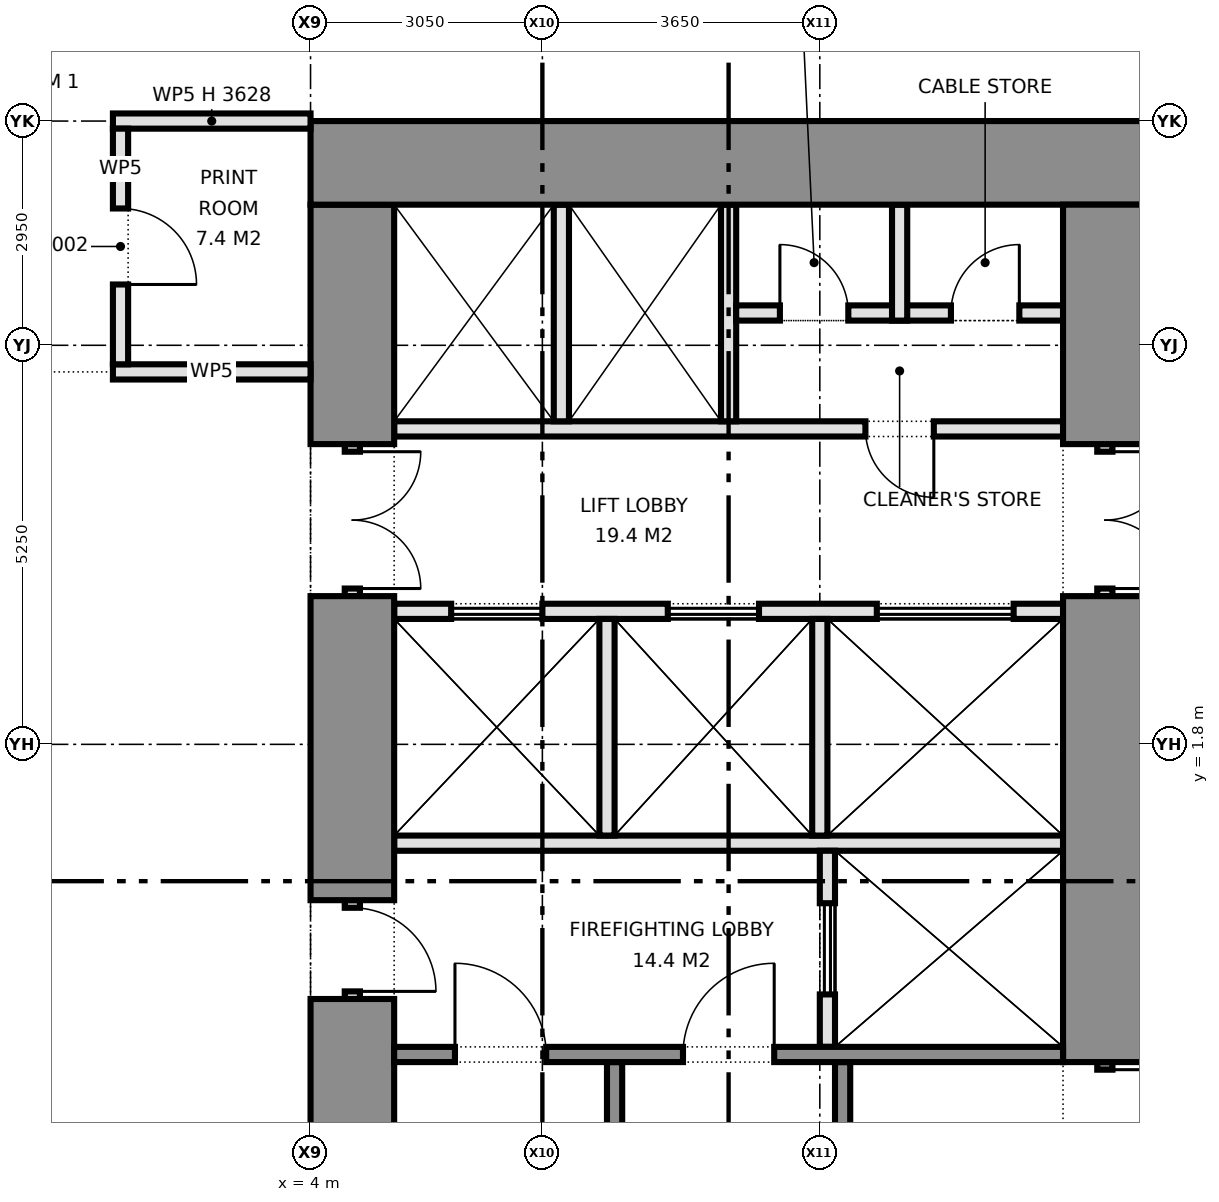
"""IFC4 building model, lengths in metres.
Left out: names, types, materials, properties, quantities, classifications, styles, units other than length and angle.
Written with IfcOpenShell. Run it as: python <this file> out.ifc"""

import sys

from ifc_helpers import new_model, si_unit, direction, frame, frame_2d, origin, place, context, subcontext, project, spatial, rectangle, extrude, element, fill, save


model = new_model("IFC4")
c1 = context("Model", 3, precision=1e-05, world=origin(), true_north=direction((0.0, 1.0)))
c2 = subcontext(c1, "Body", "Model", "MODEL_VIEW")
j1 = project(units=[si_unit("LENGTHUNIT", "METRE"), si_unit("PLANEANGLEUNIT", "RADIAN")], contexts=[c1])
p1 = place(None, origin())
s1 = spatial("IfcSite", under=j1, at=p1, CompositionType="ELEMENT")
p2 = place(p1, origin())
s2 = spatial("IfcBuilding", under=s1, at=p2, CompositionType="ELEMENT")
p3 = place(p2, frame((0.0, 0.0, 49.7)))
s3 = spatial("IfcBuildingStorey", under=s2, at=p3, CompositionType="ELEMENT", Elevation=49.7)
p4 = place(p3, frame((15.0, 9.45, 0.0), z_axis=(0.0, 0.0, 1.0), x_axis=(-1.0, 0.0, 0.0)))
e1 = element("IfcWall", 1, at=p4, inside=s3, PredefinedType="SHEAR", context=c2, shape_type="SweptSolid", body=[
    extrude(rectangle(XDim=11.0, YDim=1.1, at=frame_2d((5.5, 0.0))), origin(), (0.0, 0.0, 1.0), 4.575),
])
p5 = place(p3, frame((14.45, 8.9, 0.0), z_axis=(0.0, 0.0, 1.0), x_axis=(0.0, -1.0, 0.0)))
e2 = element("IfcWall", 2, at=p5, inside=s3, PredefinedType="SHEAR", context=c2, shape_type="SweptSolid", body=[
    extrude(rectangle(XDim=3.15, YDim=1.1, at=frame_2d((1.575, 0.0))), origin(), (0.0, 0.0, 1.0), 4.575),
])
p6 = place(p3, frame((14.45, 5.75, 0.0), z_axis=(0.0, 0.0, 1.0), x_axis=(0.0, -1.0, 0.0)))
e3 = element("IfcWall", 3, at=p6, inside=s3, PredefinedType="PARTITIONING", context=c2, shape_type="SweptSolid", body=[
    extrude(rectangle(XDim=2.0, YDim=0.2, at=frame_2d((1.0, 0.0))), origin(), (0.0, 0.0, 1.0), 2.4),
])
p7 = place(p6, frame((0.1, 0.0, 0.0)))
e4 = element("IfcOpeningElement", 4, at=p7, cuts=e3, PredefinedType="OPENING", context=c2, shape_type="SweptSolid", body=[
    extrude(rectangle(XDim=1.8, YDim=2.1, at=frame_2d((0.9, 1.05))), frame((0.0, 0.11, 0.0), z_axis=(0.0, -1.0, 0.0), x_axis=(1.0, 0.0, 0.0)), (0.0, 0.0, 1.0), 0.22),
])
p8 = place(p3, frame((14.45, 3.75, 0.0), z_axis=(0.0, 0.0, 1.0), x_axis=(0.0, -1.0, 0.0)))
e5 = element("IfcWall", 5, at=p8, inside=s3, PredefinedType="SHEAR", context=c2, shape_type="SweptSolid", body=[
    extrude(rectangle(XDim=6.13, YDim=1.1, at=frame_2d((3.065, 0.0))), origin(), (0.0, 0.0, 1.0), 4.575),
])
p9 = place(p3, frame((14.45, -2.38, 0.0), z_axis=(0.0, 0.0, 1.0), x_axis=(0.0, -1.0, 0.0)))
e6 = element("IfcWall", 6, at=p9, inside=s3, PredefinedType="SHEAR", context=c2, shape_type="SweptSolid", body=[
    extrude(rectangle(XDim=1.3, YDim=0.2, at=frame_2d((0.65, 0.0))), origin(), (0.0, 0.0, 1.0), 2.4),
])
p10 = place(p9, frame((0.1, 0.0, 0.0)))
e7 = element("IfcOpeningElement", 7, at=p10, cuts=e6, PredefinedType="OPENING", context=c2, shape_type="SweptSolid", body=[
    extrude(rectangle(XDim=1.1, YDim=2.1, at=frame_2d((0.55, 1.05))), frame((0.0, 0.11, 0.0), z_axis=(0.0, -1.0, 0.0), x_axis=(1.0, 0.0, 0.0)), (0.0, 0.0, 1.0), 0.22),
])
p11 = place(p3, frame((4.55, 8.9, 0.0), z_axis=(0.0, 0.0, 1.0), x_axis=(0.0, -1.0, 0.0)))
e8 = element("IfcWall", 8, at=p11, inside=s3, PredefinedType="SHEAR", context=c2, shape_type="SweptSolid", body=[
    extrude(rectangle(XDim=3.15, YDim=1.1, at=frame_2d((1.575, 0.0))), origin(), (0.0, 0.0, 1.0), 4.575),
])
p12 = place(p3, frame((4.55, 5.75, 0.0), z_axis=(0.0, 0.0, 1.0), x_axis=(0.0, -1.0, 0.0)))
e9 = element("IfcWall", 9, at=p12, inside=s3, PredefinedType="PARTITIONING", context=c2, shape_type="SweptSolid", body=[
    extrude(rectangle(XDim=2.0, YDim=0.2, at=frame_2d((1.0, 0.0))), origin(), (0.0, 0.0, 1.0), 2.4),
])
p13 = place(p12, frame((0.1, 0.0, 0.0)))
e10 = element("IfcOpeningElement", 10, at=p13, cuts=e9, PredefinedType="OPENING", context=c2, shape_type="SweptSolid", body=[
    extrude(rectangle(XDim=1.8, YDim=2.1, at=frame_2d((0.9, 1.05))), frame((0.0, 0.11, 0.0), z_axis=(0.0, -1.0, 0.0), x_axis=(1.0, 0.0, 0.0)), (0.0, 0.0, 1.0), 0.22),
])
p14 = place(p3, frame((4.55, 3.75, 0.0), z_axis=(0.0, 0.0, 1.0), x_axis=(0.0, -1.0, 0.0)))
e11 = element("IfcWall", 11, at=p14, inside=s3, PredefinedType="SHEAR", context=c2, shape_type="SweptSolid", body=[
    extrude(rectangle(XDim=4.0, YDim=1.1, at=frame_2d((2.0, 0.0))), origin(), (0.0, 0.0, 1.0), 4.575),
])
p15 = place(p3, frame((4.55, -0.25, 0.0), z_axis=(0.0, 0.0, 1.0), x_axis=(0.0, -1.0, 0.0)))
e12 = element("IfcWall", 12, at=p15, inside=s3, PredefinedType="PARTITIONING", context=c2, shape_type="SweptSolid", body=[
    extrude(rectangle(XDim=1.3, YDim=0.2, at=frame_2d((0.65, 0.0))), origin(), (0.0, 0.0, 1.0), 2.4),
])
p16 = place(p15, frame((0.1, 0.0, 0.0)))
e13 = element("IfcOpeningElement", 13, at=p16, cuts=e12, PredefinedType="OPENING", context=c2, shape_type="SweptSolid", body=[
    extrude(rectangle(XDim=1.1, YDim=2.1, at=frame_2d((0.55, 1.05))), frame((0.0, 0.11, 0.0), z_axis=(0.0, -1.0, 0.0), x_axis=(1.0, 0.0, 0.0)), (0.0, 0.0, 1.0), 0.22),
])
p17 = place(p3, frame((4.55, -1.55, 0.0), z_axis=(0.0, 0.0, 1.0), x_axis=(0.0, -1.0, 0.0)))
e14 = element("IfcWall", 14, at=p17, inside=s3, PredefinedType="SHEAR", context=c2, shape_type="SweptSolid", body=[
    extrude(rectangle(XDim=7.35, YDim=1.1, at=frame_2d((3.675, 0.0))), origin(), (0.0, 0.0, 1.0), 4.575),
])
p18 = place(p3, frame((13.9, 5.95, 0.0), z_axis=(0.0, 0.0, 1.0), x_axis=(-1.0, 0.0, 0.0)))
e15 = element("IfcWall", 15, at=p18, inside=s3, PredefinedType="PARTITIONING", context=c2, shape_type="SweptSolid", body=[
    extrude(rectangle(XDim=8.8, YDim=0.2, at=frame_2d((4.4, 0.0))), origin(), (0.0, 0.0, 1.0), 4.575),
])
p19 = place(p18, frame((1.7, 0.0, 0.0)))
e16 = element("IfcOpeningElement", 16, at=p19, cuts=e15, PredefinedType="OPENING", context=c2, shape_type="SweptSolid", body=[
    extrude(rectangle(XDim=0.9, YDim=2.1, at=frame_2d((0.45, 1.05))), frame((0.0, 0.11, 0.0), z_axis=(0.0, -1.0, 0.0), x_axis=(1.0, 0.0, 0.0)), (0.0, 0.0, 1.0), 0.22),
])
p20 = place(p3, frame((13.9, 3.55, 0.0), z_axis=(0.0, 0.0, 1.0), x_axis=(-1.0, 0.0, 0.0)))
e17 = element("IfcWall", 17, at=p20, inside=s3, PredefinedType="PARTITIONING", context=c2, shape_type="SweptSolid", body=[
    extrude(rectangle(XDim=8.8, YDim=0.2, at=frame_2d((4.4, 0.0))), origin(), (0.0, 0.0, 1.0), 4.575),
])
p21 = place(p20, frame((0.65, 0.0, 0.0)))
e18 = element("IfcOpeningElement", 18, at=p21, cuts=e17, PredefinedType="OPENING", context=c2, shape_type="SweptSolid", body=[
    extrude(rectangle(XDim=1.8, YDim=2.1, at=frame_2d((0.9, 1.05))), frame((0.0, 0.11, 0.0), z_axis=(0.0, -1.0, 0.0), x_axis=(1.0, 0.0, 0.0)), (0.0, 0.0, 1.0), 0.22),
])
p22 = place(p20, frame((4.0, 0.0, 0.0)))
e19 = element("IfcOpeningElement", 19, at=p22, cuts=e17, PredefinedType="OPENING", context=c2, shape_type="SweptSolid", body=[
    extrude(rectangle(XDim=1.2, YDim=2.1, at=frame_2d((0.6, 1.05))), frame((0.0, 0.11, 0.0), z_axis=(0.0, -1.0, 0.0), x_axis=(1.0, 0.0, 0.0)), (0.0, 0.0, 1.0), 0.22),
])
p23 = place(p20, frame((6.85, 0.0, 0.0)))
e20 = element("IfcOpeningElement", 20, at=p23, cuts=e17, PredefinedType="OPENING", context=c2, shape_type="SweptSolid", body=[
    extrude(rectangle(XDim=1.2, YDim=2.1, at=frame_2d((0.6, 1.05))), frame((0.0, 0.11, 0.0), z_axis=(0.0, -1.0, 0.0), x_axis=(1.0, 0.0, 0.0)), (0.0, 0.0, 1.0), 0.22),
])
p24 = place(p3, frame((13.9, 0.5, 0.0), z_axis=(0.0, 0.0, 1.0), x_axis=(-1.0, 0.0, 0.0)))
e21 = element("IfcWall", 21, at=p24, inside=s3, PredefinedType="PARTITIONING", context=c2, shape_type="SweptSolid", body=[
    extrude(rectangle(XDim=8.8, YDim=0.2, at=frame_2d((4.4, 0.0))), origin(), (0.0, 0.0, 1.0), 4.575),
])
p25 = place(p3, frame((10.8, 0.4, 0.0), z_axis=(0.0, 0.0, 1.0), x_axis=(0.0, -1.0, 0.0)))
e22 = element("IfcWall", 22, at=p25, inside=s3, PredefinedType="PARTITIONING", context=c2, shape_type="SweptSolid", body=[
    extrude(rectangle(XDim=2.58, YDim=0.2, at=frame_2d((1.29, 0.0))), origin(), (0.0, 0.0, 1.0), 4.575),
])
p26 = place(p25, frame((0.69, 0.0, 0.0)))
e23 = element("IfcOpeningElement", 23, at=p26, cuts=e22, PredefinedType="OPENING", context=c2, shape_type="SweptSolid", body=[
    extrude(rectangle(XDim=1.2, YDim=2.1, at=frame_2d((0.6, 1.05))), frame((0.0, 0.11, 0.0), z_axis=(0.0, -1.0, 0.0), x_axis=(1.0, 0.0, 0.0)), (0.0, 0.0, 1.0), 0.22),
])
p27 = place(p3, frame((13.9, -2.28, 0.0), z_axis=(0.0, 0.0, 1.0), x_axis=(-1.0, 0.0, 0.0)))
e24 = element("IfcWall", 24, at=p27, inside=s3, PredefinedType="SHEAR", context=c2, shape_type="SweptSolid", body=[
    extrude(rectangle(XDim=8.8, YDim=0.2, at=frame_2d((4.4, 0.0))), origin(), (0.0, 0.0, 1.0), 4.575),
])
p28 = place(p27, frame((3.8, 0.0, 0.0)))
e25 = element("IfcOpeningElement", 25, at=p28, cuts=e24, PredefinedType="OPENING", context=c2, shape_type="SweptSolid", body=[
    extrude(rectangle(XDim=1.2, YDim=2.1, at=frame_2d((0.6, 1.05))), frame((0.0, 0.11, 0.0), z_axis=(0.0, -1.0, 0.0), x_axis=(1.0, 0.0, 0.0)), (0.0, 0.0, 1.0), 0.22),
])
p29 = place(p27, frame((6.8, 0.0, 0.0)))
e26 = element("IfcOpeningElement", 26, at=p29, cuts=e24, PredefinedType="OPENING", context=c2, shape_type="SweptSolid", body=[
    extrude(rectangle(XDim=1.2, YDim=2.1, at=frame_2d((0.6, 1.05))), frame((0.0, 0.11, 0.0), z_axis=(0.0, -1.0, 0.0), x_axis=(1.0, 0.0, 0.0)), (0.0, 0.0, 1.0), 0.22),
])
for number, where, z_axis, x_axis in (
    (27, (11.0, -2.38, 0.0), (0.0, 0.0, 1.0), (0.0, -1.0, 0.0)),
    (28, (8.0, -2.38, 0.0), (0.0, 0.0, 1.0), (0.0, -1.0, 0.0)),
):
    element("IfcWall", number, at=place(p3, frame(where, z_axis=z_axis, x_axis=x_axis)), inside=s3, PredefinedType="SHEAR", context=c2, shape_type="SweptSolid", body=[
        extrude(rectangle(XDim=6.52, YDim=0.2, at=frame_2d((3.26, 0.0))), origin(), (0.0, 0.0, 1.0), 4.575),
    ])
for number, where, z_axis, x_axis in (
    (29, (9.5, 8.9, 0.0), (0.0, 0.0, 1.0), (0.0, -1.0, 0.0)),
    (30, (7.3, 8.9, 0.0), (0.0, 0.0, 1.0), (0.0, -1.0, 0.0)),
):
    element("IfcWall", number, at=place(p3, frame(where, z_axis=z_axis, x_axis=x_axis)), inside=s3, PredefinedType="PARTITIONING", context=c2, shape_type="SweptSolid", body=[
        extrude(rectangle(XDim=2.85, YDim=0.2, at=frame_2d((1.425, 0.0))), origin(), (0.0, 0.0, 1.0), 4.575),
    ])
p30 = place(p3, frame((13.9, 7.475, 0.0), z_axis=(0.0, 0.0, 1.0), x_axis=(-1.0, 0.0, 0.0)))
e31 = element("IfcWall", 31, at=p30, inside=s3, PredefinedType="PARTITIONING", context=c2, shape_type="SweptSolid", body=[
    extrude(rectangle(XDim=4.3, YDim=0.2, at=frame_2d((2.15, 0.0))), origin(), (0.0, 0.0, 1.0), 4.575),
])
p31 = place(p30, frame((0.575, 0.0, 0.0)))
e32 = element("IfcOpeningElement", 32, at=p31, cuts=e31, PredefinedType="OPENING", context=c2, shape_type="SweptSolid", body=[
    extrude(rectangle(XDim=0.9, YDim=2.1, at=frame_2d((0.45, 1.05))), frame((0.0, 0.11, 0.0), z_axis=(0.0, -1.0, 0.0), x_axis=(1.0, 0.0, 0.0)), (0.0, 0.0, 1.0), 0.22),
])
p32 = place(p30, frame((2.825, 0.0, 0.0)))
e33 = element("IfcOpeningElement", 33, at=p32, cuts=e31, PredefinedType="OPENING", context=c2, shape_type="SweptSolid", body=[
    extrude(rectangle(XDim=0.9, YDim=2.1, at=frame_2d((0.45, 1.05))), frame((0.0, 0.11, 0.0), z_axis=(0.0, -1.0, 0.0), x_axis=(1.0, 0.0, 0.0)), (0.0, 0.0, 1.0), 0.22),
])
p33 = place(p3, frame((11.75, 8.9, 0.0), z_axis=(0.0, 0.0, 1.0), x_axis=(0.0, -1.0, 0.0)))
e34 = element("IfcWall", 34, at=p33, inside=s3, PredefinedType="PARTITIONING", context=c2, shape_type="SweptSolid", body=[
    extrude(rectangle(XDim=1.525, YDim=0.2, at=frame_2d((0.762, 0.0))), origin(), (0.0, 0.0, 1.0), 4.575),
])
for number, where, z_axis, x_axis in (
    (35, (10.7, 3.45, 0.0), (0.0, 0.0, 1.0), (0.0, -1.0, 0.0)),
    (36, (7.9, 3.45, 0.0), (0.0, 0.0, 1.0), (0.0, -1.0, 0.0)),
):
    element("IfcWall", number, at=place(p3, frame(where, z_axis=z_axis, x_axis=x_axis)), inside=s3, PredefinedType="PARTITIONING", context=c2, shape_type="SweptSolid", body=[
        extrude(rectangle(XDim=2.85, YDim=0.2, at=frame_2d((1.425, 0.0))), origin(), (0.0, 0.0, 1.0), 4.575),
    ])
p34 = place(p3, frame((1.4, 6.7, 0.0), z_axis=(0.0, 0.0, 1.0), x_axis=(1.0, 0.0, 0.0)))
e37 = element("IfcWall", 37, at=p34, inside=s3, PredefinedType="PARTITIONING", context=c2, shape_type="SweptSolid", body=[
    extrude(rectangle(XDim=2.6, YDim=0.2, at=frame_2d((1.3, 0.0))), origin(), (0.0, 0.0, 1.0), 4.575),
])
p35 = place(p3, frame((1.4, 10.0, 0.0), z_axis=(0.0, 0.0, 1.0), x_axis=(1.0, 0.0, 0.0)))
e38 = element("IfcWall", 38, at=p35, inside=s3, PredefinedType="PARTITIONING", context=c2, shape_type="SweptSolid", body=[
    extrude(rectangle(XDim=2.6, YDim=0.2, at=frame_2d((1.3, 0.0))), origin(), (0.0, 0.0, 1.0), 3.628),
])
p36 = place(p3, frame((1.5, 6.8, 0.0), z_axis=(0.0, 0.0, 1.0), x_axis=(0.0, 1.0, 0.0)))
e39 = element("IfcWall", 39, at=p36, inside=s3, PredefinedType="PARTITIONING", context=c2, shape_type="SweptSolid", body=[
    extrude(rectangle(XDim=3.1, YDim=0.2, at=frame_2d((1.55, 0.0))), origin(), (0.0, 0.0, 1.0), 4.575),
])
p37 = place(p36, frame((1.05, 0.0, 0.0)))
e40 = element("IfcOpeningElement", 40, at=p37, cuts=e39, PredefinedType="OPENING", context=c2, shape_type="SweptSolid", body=[
    extrude(rectangle(XDim=1.0, YDim=2.1, at=frame_2d((0.5, 1.05))), frame((0.0, 0.11, 0.0), z_axis=(0.0, -1.0, 0.0), x_axis=(1.0, 0.0, 0.0)), (0.0, 0.0, 1.0), 0.22),
])
p38 = place(p7, origin())
e41 = element("IfcDoor", 41, at=p38, inside=s3, OperationType="DOUBLE_DOOR_SINGLE_SWING", PredefinedType="DOOR", context=c2, shape_type="SweptSolid", body=[
    extrude(rectangle(XDim=1.8, YDim=2.1, at=frame_2d((0.9, 1.05))), frame((0.0, 0.025, 0.0), z_axis=(0.0, -1.0, 0.0), x_axis=(1.0, 0.0, 0.0)), (0.0, 0.0, 1.0), 0.05),
])
fill(e4, e41)
p39 = place(p10, origin())
e42 = element("IfcDoor", 42, at=p39, inside=s3, OperationType="SINGLE_SWING_LEFT", PredefinedType="DOOR", context=c2, shape_type="SweptSolid", body=[
    extrude(rectangle(XDim=1.1, YDim=2.1, at=frame_2d((0.55, 1.05))), frame((0.0, 0.025, 0.0), z_axis=(0.0, -1.0, 0.0), x_axis=(1.0, 0.0, 0.0)), (0.0, 0.0, 1.0), 0.05),
])
fill(e7, e42)
p40 = place(p13, origin())
e43 = element("IfcDoor", 43, at=p40, inside=s3, OperationType="DOUBLE_DOOR_SINGLE_SWING", PredefinedType="DOOR", context=c2, shape_type="SweptSolid", body=[
    extrude(rectangle(XDim=1.8, YDim=2.1, at=frame_2d((0.9, 1.05))), frame((0.0, 0.025, 0.0), z_axis=(0.0, -1.0, 0.0), x_axis=(1.0, 0.0, 0.0)), (0.0, 0.0, 1.0), 0.05),
])
fill(e10, e43)
p41 = place(p16, origin())
e44 = element("IfcDoor", 44, at=p41, inside=s3, OperationType="SINGLE_SWING_RIGHT", PredefinedType="DOOR", context=c2, shape_type="SweptSolid", body=[
    extrude(rectangle(XDim=1.1, YDim=2.1, at=frame_2d((0.55, 1.05))), frame((0.0, 0.025, 0.0), z_axis=(0.0, -1.0, 0.0), x_axis=(1.0, 0.0, 0.0)), (0.0, 0.0, 1.0), 0.05),
])
fill(e13, e44)
p42 = place(p21, origin())
e45 = element("IfcDoor", 45, at=p42, inside=s3, OperationType="DOUBLE_DOOR_SLIDING", PredefinedType="DOOR", context=c2, shape_type="SweptSolid", body=[
    extrude(rectangle(XDim=1.8, YDim=2.1, at=frame_2d((0.9, 1.05))), frame((0.0, 0.025, 0.0), z_axis=(0.0, -1.0, 0.0), x_axis=(1.0, 0.0, 0.0)), (0.0, 0.0, 1.0), 0.05),
])
fill(e18, e45)
p43 = place(p22, origin())
e46 = element("IfcDoor", 46, at=p43, inside=s3, OperationType="DOUBLE_DOOR_SLIDING", PredefinedType="DOOR", context=c2, shape_type="SweptSolid", body=[
    extrude(rectangle(XDim=1.2, YDim=2.1, at=frame_2d((0.6, 1.05))), frame((0.0, 0.025, 0.0), z_axis=(0.0, -1.0, 0.0), x_axis=(1.0, 0.0, 0.0)), (0.0, 0.0, 1.0), 0.05),
])
fill(e19, e46)
p44 = place(p23, origin())
e47 = element("IfcDoor", 47, at=p44, inside=s3, OperationType="DOUBLE_DOOR_SLIDING", PredefinedType="DOOR", context=c2, shape_type="SweptSolid", body=[
    extrude(rectangle(XDim=1.2, YDim=2.1, at=frame_2d((0.6, 1.05))), frame((0.0, 0.025, 0.0), z_axis=(0.0, -1.0, 0.0), x_axis=(1.0, 0.0, 0.0)), (0.0, 0.0, 1.0), 0.05),
])
fill(e20, e47)
p45 = place(p26, origin())
e48 = element("IfcDoor", 48, at=p45, inside=s3, OperationType="DOUBLE_DOOR_SLIDING", PredefinedType="DOOR", context=c2, shape_type="SweptSolid", body=[
    extrude(rectangle(XDim=1.2, YDim=2.1, at=frame_2d((0.6, 1.05))), frame((0.0, 0.025, 0.0), z_axis=(0.0, -1.0, 0.0), x_axis=(1.0, 0.0, 0.0)), (0.0, 0.0, 1.0), 0.05),
])
fill(e23, e48)
p46 = place(p19, origin())
e49 = element("IfcDoor", 49, at=p46, inside=s3, OperationType="SINGLE_SWING_LEFT", PredefinedType="DOOR", context=c2, shape_type="SweptSolid", body=[
    extrude(rectangle(XDim=0.9, YDim=2.1, at=frame_2d((0.45, 1.05))), frame((0.0, 0.025, 0.0), z_axis=(0.0, -1.0, 0.0), x_axis=(1.0, 0.0, 0.0)), (0.0, 0.0, 1.0), 0.05),
])
fill(e16, e49)
p47 = place(p31, frame((0.9, 0.0, 0.0), z_axis=(0.0, 0.0, 1.0), x_axis=(-1.0, 0.0, 0.0)))
e50 = element("IfcDoor", 50, at=p47, inside=s3, OperationType="SINGLE_SWING_RIGHT", PredefinedType="DOOR", context=c2, shape_type="SweptSolid", body=[
    extrude(rectangle(XDim=0.9, YDim=2.1, at=frame_2d((0.45, 1.05))), frame((0.0, 0.025, 0.0), z_axis=(0.0, -1.0, 0.0), x_axis=(1.0, 0.0, 0.0)), (0.0, 0.0, 1.0), 0.05),
])
fill(e32, e50)
p48 = place(p32, frame((0.9, 0.0, 0.0), z_axis=(0.0, 0.0, 1.0), x_axis=(-1.0, 0.0, 0.0)))
e51 = element("IfcDoor", 51, at=p48, inside=s3, OperationType="SINGLE_SWING_LEFT", PredefinedType="DOOR", context=c2, shape_type="SweptSolid", body=[
    extrude(rectangle(XDim=0.9, YDim=2.1, at=frame_2d((0.45, 1.05))), frame((0.0, 0.025, 0.0), z_axis=(0.0, -1.0, 0.0), x_axis=(1.0, 0.0, 0.0)), (0.0, 0.0, 1.0), 0.05),
])
fill(e33, e51)
p49 = place(p28, frame((1.2, 0.0, 0.0), z_axis=(0.0, 0.0, 1.0), x_axis=(-1.0, 0.0, 0.0)))
e52 = element("IfcDoor", 52, at=p49, inside=s3, OperationType="SINGLE_SWING_RIGHT", PredefinedType="DOOR", context=c2, shape_type="SweptSolid", body=[
    extrude(rectangle(XDim=1.2, YDim=2.1, at=frame_2d((0.6, 1.05))), frame((0.0, 0.025, 0.0), z_axis=(0.0, -1.0, 0.0), x_axis=(1.0, 0.0, 0.0)), (0.0, 0.0, 1.0), 0.05),
])
fill(e25, e52)
p50 = place(p29, frame((1.2, 0.0, 0.0), z_axis=(0.0, 0.0, 1.0), x_axis=(-1.0, 0.0, 0.0)))
e53 = element("IfcDoor", 53, at=p50, inside=s3, OperationType="SINGLE_SWING_LEFT", PredefinedType="DOOR", context=c2, shape_type="SweptSolid", body=[
    extrude(rectangle(XDim=1.2, YDim=2.1, at=frame_2d((0.6, 1.05))), frame((0.0, 0.025, 0.0), z_axis=(0.0, -1.0, 0.0), x_axis=(1.0, 0.0, 0.0)), (0.0, 0.0, 1.0), 0.05),
])
fill(e26, e53)
p51 = place(p37, frame((1.0, 0.0, 0.0), z_axis=(0.0, 0.0, 1.0), x_axis=(-1.0, 0.0, 0.0)))
e54 = element("IfcDoor", 54, at=p51, inside=s3, OperationType="SINGLE_SWING_RIGHT", PredefinedType="DOOR", context=c2, shape_type="SweptSolid", body=[
    extrude(rectangle(XDim=1.0, YDim=2.1, at=frame_2d((0.5, 1.05))), frame((0.0, 0.025, 0.0), z_axis=(0.0, -1.0, 0.0), x_axis=(1.0, 0.0, 0.0)), (0.0, 0.0, 1.0), 0.05),
])
fill(e40, e54)
save(model, sys.argv[1])
